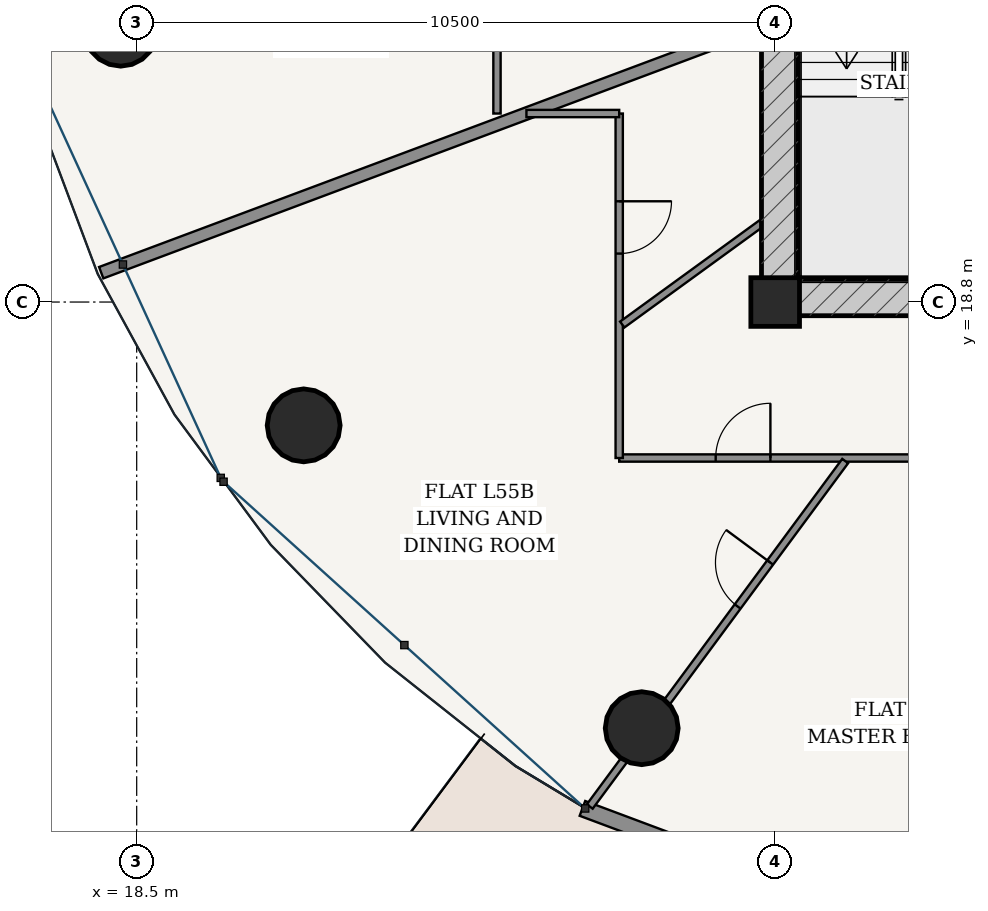
"""IFC4 building model, lengths in metres.
Left out: names, types, materials, properties, quantities, classifications, styles, units other than length and angle.
Written with IfcOpenShell. Run it as: python <this file> out.ifc"""

import sys

from ifc_helpers import new_model, si_unit, direction, frame, frame_2d, origin, origin_2d, place, context, subcontext, project, spatial, rectangle, hollow_circle, extrude, source, transform, mapped, element, fill, save


model = new_model("IFC4")
c1 = context("Model", 3, precision=1e-05, world=origin(), true_north=direction((-0.2419218956, 0.970295726276)))
c2 = subcontext(c1, "Body", "Model", "MODEL_VIEW")
j1 = project(units=[si_unit("LENGTHUNIT", "METRE"), si_unit("PLANEANGLEUNIT", "RADIAN")], contexts=[c1])
p1 = place(None, origin())
s1 = spatial("IfcSite", under=j1, at=p1, CompositionType="ELEMENT")
p2 = place(p1, origin())
s2 = spatial("IfcBuilding", under=s1, at=p2, CompositionType="ELEMENT")
p3 = place(p2, frame((0.0, 0.0, 209.7)))
s3 = spatial("IfcBuildingStorey", under=s2, at=p3, CompositionType="ELEMENT", Elevation=209.7)
p4 = place(p3, frame((29.0, 18.8, 0.0), z_axis=(0.0, 0.0, 1.0), x_axis=(1.0, 0.0, 0.0)))
e1 = element("IfcColumn", 1, at=p4, inside=s3, PredefinedType="COLUMN", context=c2, shape_type="SweptSolid", body=[
    extrude(rectangle(XDim=0.8, YDim=0.8, at=origin_2d()), origin(), (0.0, 0.0, 1.0), 3.7),
])
p5 = place(p3, frame((28.775, 18.875, 0.0), z_axis=(0.0, 0.0, 1.0), x_axis=(1.0, 0.0, 0.0)))
e2 = element("IfcWall", 2, at=p5, inside=s3, PredefinedType="SHEAR", context=c2, shape_type="SweptSolid", body=[
    extrude(rectangle(XDim=18.45, YDim=0.6, at=frame_2d((9.225, 0.0))), origin(), (0.0, 0.0, 1.0), 3.435),
])
p6 = place(p5, frame((6.76, 0.0, 0.0)))
e3 = element("IfcOpeningElement", 3, at=p6, cuts=e2, PredefinedType="OPENING", context=c2, shape_type="SweptSolid", body=[
    extrude(rectangle(XDim=0.85, YDim=2.1, at=frame_2d((0.425, 1.05))), frame((0.0, 0.31, 0.0), z_axis=(0.0, -1.0, 0.0), x_axis=(1.0, 0.0, 0.0)), (0.0, 0.0, 1.0), 0.62),
])
p7 = place(p5, frame((8.8, 0.0, 0.0)))
e4 = element("IfcOpeningElement", 4, at=p7, cuts=e2, PredefinedType="OPENING", context=c2, shape_type="SweptSolid", body=[
    extrude(rectangle(XDim=0.85, YDim=2.1, at=frame_2d((0.425, 1.05))), frame((0.0, 0.31, 0.0), z_axis=(0.0, -1.0, 0.0), x_axis=(1.0, 0.0, 0.0)), (0.0, 0.0, 1.0), 0.62),
])
p8 = place(p5, frame((10.84, 0.0, 0.0)))
e5 = element("IfcOpeningElement", 5, at=p8, cuts=e2, PredefinedType="OPENING", context=c2, shape_type="SweptSolid", body=[
    extrude(rectangle(XDim=0.85, YDim=2.1, at=frame_2d((0.425, 1.05))), frame((0.0, 0.31, 0.0), z_axis=(0.0, -1.0, 0.0), x_axis=(1.0, 0.0, 0.0)), (0.0, 0.0, 1.0), 0.62),
])
p9 = place(p3, frame((29.075, 19.175, 0.0), z_axis=(0.0, 0.0, 1.0), x_axis=(0.0, 1.0, 0.0)))
e6 = element("IfcWall", 6, at=p9, inside=s3, PredefinedType="SHEAR", context=c2, shape_type="SweptSolid", body=[
    extrude(rectangle(XDim=15.25, YDim=0.6, at=frame_2d((7.625, 0.0))), origin(), (0.0, 0.0, 1.0), 3.435),
])
p10 = place(p9, frame((9.875, 0.0, 0.0)))
e7 = element("IfcOpeningElement", 7, at=p10, cuts=e6, PredefinedType="OPENING", context=c2, shape_type="SweptSolid", body=[
    extrude(rectangle(XDim=1.5, YDim=2.2, at=frame_2d((0.75, 1.1))), frame((0.0, 0.31, 0.0), z_axis=(0.0, -1.0, 0.0), x_axis=(1.0, 0.0, 0.0)), (0.0, 0.0, 1.0), 0.62),
])
for number, where, z_axis, x_axis in (
    (8, (18.237, 23.279, 0.0), (0.0, 0.0, 1.0), (1.0, 0.0, 0.0)),
    (9, (21.246, 16.772, 0.0), (0.0, 0.0, 1.0), (1.0, 0.0, 0.0)),
    (10, (26.805, 11.792, 0.0), (0.0, 0.0, 1.0), (1.0, 0.0, 0.0)),
):
    element("IfcColumn", number, at=place(p3, frame(where, z_axis=z_axis, x_axis=x_axis)), inside=s3, PredefinedType="COLUMN", context=c2, shape_type="SweptSolid", body=[
        extrude(hollow_circle(Radius=0.6, WallThickness=0.038, at=origin_2d()), origin(), (0.0, 0.0, 1.0), 3.7),
    ])
p11 = place(p3, frame((25.83, 10.473, 0.0), z_axis=(0.0, 0.0, 1.0), x_axis=(0.936556918375, -0.350515532672, 0.0)))
e11 = element("IfcWall", 11, at=p11, inside=s3, PredefinedType="SOLIDWALL", context=c2, shape_type="SweptSolid", body=[
    extrude(rectangle(XDim=8.539, YDim=0.26, at=frame_2d((4.27, 0.0))), origin(), (0.0, 0.0, 1.0), 3.435),
])
p12 = place(p11, frame((3.594, 0.0, 0.0)))
e12 = element("IfcOpeningElement", 12, at=p12, cuts=e11, PredefinedType="OPENING", context=c2, shape_type="SweptSolid", body=[
    extrude(rectangle(XDim=1.35, YDim=2.2, at=frame_2d((0.675, 1.1))), frame((0.0, 0.14, 0.0), z_axis=(0.0, -1.0, 0.0), x_axis=(1.0, 0.0, 0.0)), (0.0, 0.0, 1.0), 0.28),
])
p13 = place(p3, frame((24.425, 21.9, 0.0), z_axis=(0.0, 0.0, 1.0), x_axis=(0.0, 1.0, 0.0)))
e13 = element("IfcWall", 13, at=p13, inside=s3, PredefinedType="PARTITIONING", context=c2, shape_type="SweptSolid", body=[
    extrude(rectangle(XDim=15.625, YDim=0.12, at=frame_2d((7.812, 0.0))), origin(), (0.0, 0.0, 1.0), 2.951),
])
p14 = place(p13, frame((11.611, 0.0, 0.0)))
e14 = element("IfcOpeningElement", 14, at=p14, cuts=e13, PredefinedType="OPENING", context=c2, shape_type="SweptSolid", body=[
    extrude(rectangle(XDim=0.9, YDim=2.15, at=frame_2d((0.45, 1.075))), frame((0.0, 0.07, 0.0), z_axis=(0.0, -1.0, 0.0), x_axis=(1.0, 0.0, 0.0)), (0.0, 0.0, 1.0), 0.14),
])
p15 = place(p3, frame((28.775, 23.347, 0.0), z_axis=(0.0, 0.0, 1.0), x_axis=(-0.936537569358, -0.350567227761, 0.0)))
e15 = element("IfcWall", 15, at=p15, inside=s3, PredefinedType="PARTITIONING", context=c2, shape_type="SweptSolid", body=[
    extrude(rectangle(XDim=11.594, YDim=0.2, at=frame_2d((5.797, 0.0))), origin(), (0.0, 0.0, 1.0), 2.951),
])
p16 = place(p3, frame((31.9, 16.235, 0.0), z_axis=(0.0, 0.0, 1.0), x_axis=(-1.0, 0.0, 0.0)))
e16 = element("IfcWall", 16, at=p16, inside=s3, PredefinedType="PARTITIONING", context=c2, shape_type="SweptSolid", body=[
    extrude(rectangle(XDim=5.465, YDim=0.12, at=frame_2d((2.732, 0.0))), origin(), (0.0, 0.0, 1.0), 2.951),
])
p17 = place(p16, frame((2.979, 0.0, 0.0)))
e17 = element("IfcOpeningElement", 17, at=p17, cuts=e16, PredefinedType="OPENING", context=c2, shape_type="SweptSolid", body=[
    extrude(rectangle(XDim=0.9, YDim=2.15, at=frame_2d((0.45, 1.075))), frame((0.0, 0.07, 0.0), z_axis=(0.0, -1.0, 0.0), x_axis=(1.0, 0.0, 0.0)), (0.0, 0.0, 1.0), 0.14),
])
p18 = place(p3, frame((26.435, 16.235, 0.0), z_axis=(0.0, 0.0, 1.0), x_axis=(0.0, 1.0, 0.0)))
e18 = element("IfcWall", 18, at=p18, inside=s3, PredefinedType="PARTITIONING", context=c2, shape_type="SweptSolid", body=[
    extrude(rectangle(XDim=5.665, YDim=0.12, at=frame_2d((2.833, 0.0))), origin(), (0.0, 0.0, 1.0), 2.951),
])
p19 = place(p18, frame((3.362, 0.0, 0.0)))
e19 = element("IfcOpeningElement", 19, at=p19, cuts=e18, PredefinedType="OPENING", context=c2, shape_type="SweptSolid", body=[
    extrude(rectangle(XDim=0.86, YDim=2.15, at=frame_2d((0.43, 1.075))), frame((0.0, 0.07, 0.0), z_axis=(0.0, -1.0, 0.0), x_axis=(1.0, 0.0, 0.0)), (0.0, 0.0, 1.0), 0.14),
])
p20 = place(p3, frame((26.435, 21.9, 0.0), z_axis=(0.0, 0.0, 1.0), x_axis=(-1.0, 0.0, 0.0)))
e20 = element("IfcWall", 20, at=p20, inside=s3, PredefinedType="PARTITIONING", context=c2, shape_type="SweptSolid", body=[
    extrude(rectangle(XDim=1.526, YDim=0.12, at=frame_2d((0.763, 0.0))), origin(), (0.0, 0.0, 1.0), 3.435),
])
p21 = place(p3, frame((30.151, 16.185, 0.0), z_axis=(0.0, 0.0, 1.0), x_axis=(-0.594540664599, -0.804065543434, 0.0)))
e21 = element("IfcWall", 21, at=p21, inside=s3, PredefinedType="PARTITIONING", context=c2, shape_type="SweptSolid", body=[
    extrude(rectangle(XDim=7.066, YDim=0.12, at=frame_2d((3.533, 0.0))), origin(), (0.0, 0.0, 1.0), 2.951),
])
p22 = place(p21, frame((2.075, 0.0, 0.0)))
e22 = element("IfcOpeningElement", 22, at=p22, cuts=e21, PredefinedType="OPENING", context=c2, shape_type="SweptSolid", body=[
    extrude(rectangle(XDim=0.9, YDim=2.15, at=frame_2d((0.45, 1.075))), frame((0.0, 0.07, 0.0), z_axis=(0.0, -1.0, 0.0), x_axis=(1.0, 0.0, 0.0)), (0.0, 0.0, 1.0), 0.14),
])
p23 = place(p3, frame((28.775, 20.094, 0.0), z_axis=(0.0, 0.0, 1.0), x_axis=(-0.808862864425, -0.587997335499, 0.0)))
e23 = element("IfcWall", 23, at=p23, inside=s3, PredefinedType="PARTITIONING", context=c2, shape_type="SweptSolid", body=[
    extrude(rectangle(XDim=2.831, YDim=0.12, at=frame_2d((1.416, 0.0))), origin(), (0.0, 0.0, 1.0), 3.435),
])
m1 = source(origin(), c2, "Body", "SweptSolid", [
    extrude(rectangle(XDim=0.9, YDim=2.15, at=frame_2d((0.45, 1.075))), frame((0.0, 0.025, 0.0), z_axis=(0.0, -1.0, 0.0), x_axis=(1.0, 0.0, 0.0)), (0.0, 0.0, 1.0), 0.05),
])
p24 = place(p22, frame((0.9, 0.0, 0.0), z_axis=(0.0, 0.0, 1.0), x_axis=(-1.0, 0.0, 0.0)))
e24 = element("IfcDoor", 24, at=p24, inside=s3, OperationType="SINGLE_SWING_RIGHT", PredefinedType="DOOR", context=c2, shape_type="MappedRepresentation", body=[
    mapped(m1, transform((0.0, 0.0, 0.0), scale=1.0)),
])
fill(e22, e24)
m2 = source(origin(), c2, "Body", "SweptSolid", [
    extrude(rectangle(XDim=0.86, YDim=2.15, at=frame_2d((0.43, 1.075))), frame((0.0, 0.025, 0.0), z_axis=(0.0, -1.0, 0.0), x_axis=(1.0, 0.0, 0.0)), (0.0, 0.0, 1.0), 0.05),
])
p25 = place(p19, frame((0.86, 0.0, 0.0), z_axis=(0.0, 0.0, 1.0), x_axis=(-1.0, 0.0, 0.0)))
e25 = element("IfcDoor", 25, at=p25, inside=s3, OperationType="SINGLE_SWING_LEFT", PredefinedType="DOOR", context=c2, shape_type="MappedRepresentation", body=[
    mapped(m2, transform((0.0, 0.0, 0.0), scale=1.0)),
])
fill(e19, e25)
p26 = place(p17, frame((0.9, 0.0, 0.0), z_axis=(0.0, 0.0, 1.0), x_axis=(-1.0, 0.0, 0.0)))
e26 = element("IfcDoor", 26, at=p26, inside=s3, OperationType="SINGLE_SWING_RIGHT", PredefinedType="DOOR", context=c2, shape_type="MappedRepresentation", body=[
    mapped(m1, transform((0.0, 0.0, 0.0), scale=1.0)),
])
fill(e17, e26)
save(model, sys.argv[1])
